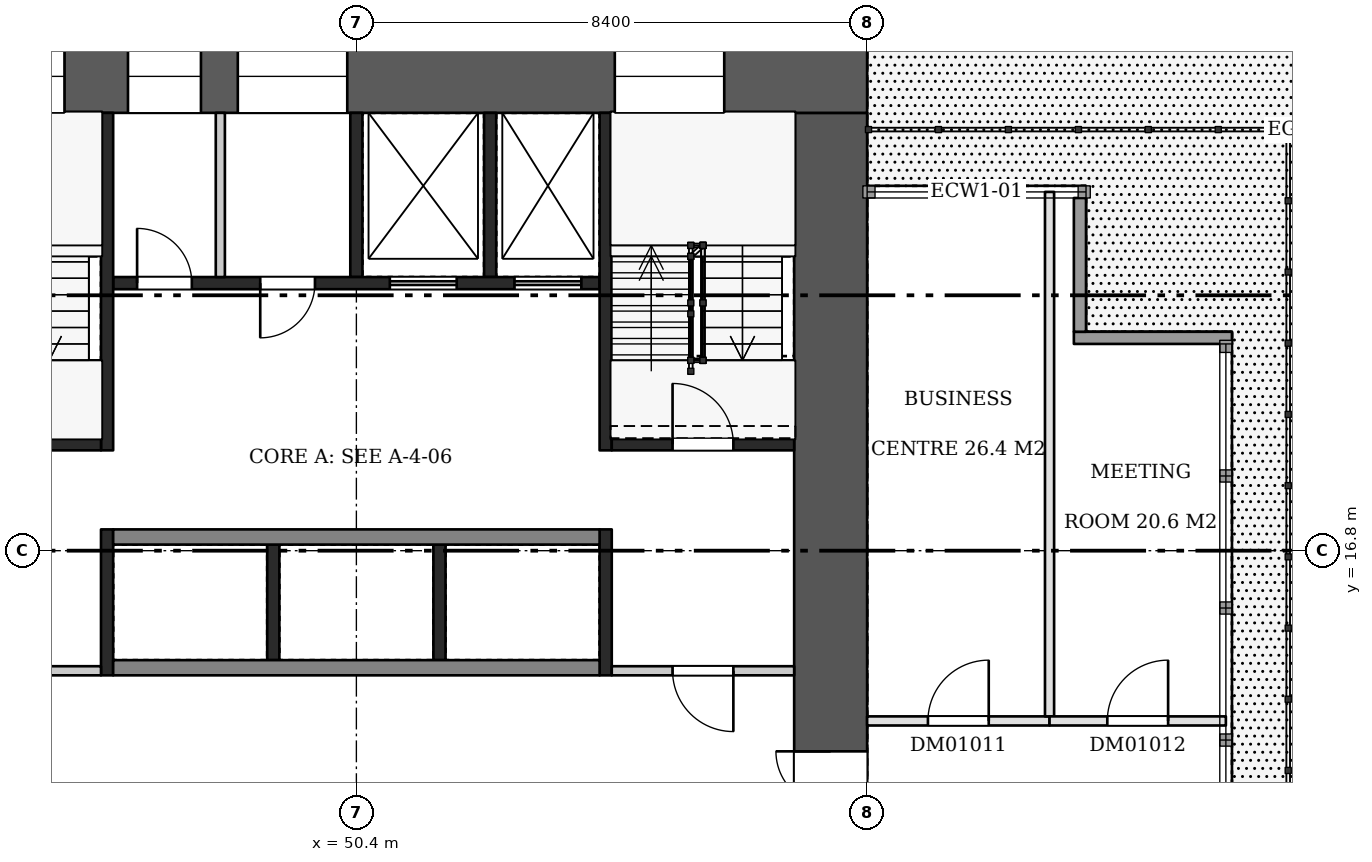
"""IFC4 building model, lengths in metres.
Left out: names, types, materials, properties, quantities, classifications, styles, units other than length and angle.
Written with IfcOpenShell. Run it as: python <this file> out.ifc"""

import sys

from ifc_helpers import new_model, si_unit, direction, frame, frame_2d, origin, place, context, subcontext, project, spatial, rectangle, extrude, element, fill, save


model = new_model("IFC4")
c1 = context("Model", 3, precision=1e-05, world=origin(), true_north=direction((0.0, 1.0)))
c2 = subcontext(c1, "Body", "Model", "MODEL_VIEW")
j1 = project(units=[si_unit("LENGTHUNIT", "METRE"), si_unit("PLANEANGLEUNIT", "RADIAN")], contexts=[c1])
p1 = place(None, origin())
s1 = spatial("IfcSite", under=j1, at=p1, CompositionType="ELEMENT")
p2 = place(p1, origin())
s2 = spatial("IfcBuilding", under=s1, at=p2, CompositionType="ELEMENT")
p3 = place(p2, frame((0.0, 0.0, 9.0)))
s3 = spatial("IfcBuildingStorey", under=s2, at=p3, CompositionType="ELEMENT", Elevation=9.0)
p4 = place(p3, frame((42.0, 24.6, 0.0), z_axis=(0.0, 0.0, 1.0), x_axis=(1.0, 0.0, 0.0)))
e1 = element("IfcWall", 1, at=p4, inside=s3, PredefinedType="SHEAR", context=c2, shape_type="SweptSolid", body=[
    extrude(rectangle(XDim=16.8, YDim=1.2, at=frame_2d((8.4, 0.0))), origin(), (0.0, 0.0, 1.0), 4.98),
])
p5 = place(p4, frame((1.8, 0.0, 0.5)))
e2 = element("IfcOpeningElement", 2, at=p5, cuts=e1, PredefinedType="OPENING", context=c2, shape_type="SweptSolid", body=[
    extrude(rectangle(XDim=1.8, YDim=2.4, at=frame_2d((0.9, 1.2))), frame((0.0, 0.61, 0.0), z_axis=(0.0, -1.0, 0.0), x_axis=(1.0, 0.0, 0.0)), (0.0, 0.0, 1.0), 1.22),
])
p6 = place(p4, frame((4.644, 0.0, 1.6)))
e3 = element("IfcOpeningElement", 3, at=p6, cuts=e1, PredefinedType="OPENING", context=c2, shape_type="SweptSolid", body=[
    extrude(rectangle(XDim=1.2, YDim=1.2, at=frame_2d((0.6, 0.6))), frame((0.0, 0.61, 0.0), z_axis=(0.0, -1.0, 0.0), x_axis=(1.0, 0.0, 0.0)), (0.0, 0.0, 1.0), 1.22),
])
p7 = place(p4, frame((6.45, 0.0, 1.6)))
e4 = element("IfcOpeningElement", 4, at=p7, cuts=e1, PredefinedType="OPENING", context=c2, shape_type="SweptSolid", body=[
    extrude(rectangle(XDim=1.8, YDim=1.2, at=frame_2d((0.9, 0.6))), frame((0.0, 0.61, 0.0), z_axis=(0.0, -1.0, 0.0), x_axis=(1.0, 0.0, 0.0)), (0.0, 0.0, 1.0), 1.22),
])
p8 = place(p4, frame((12.65, 0.0, 0.5)))
e5 = element("IfcOpeningElement", 5, at=p8, cuts=e1, PredefinedType="OPENING", context=c2, shape_type="SweptSolid", body=[
    extrude(rectangle(XDim=1.8, YDim=2.4, at=frame_2d((0.9, 1.2))), frame((0.0, 0.61, 0.0), z_axis=(0.0, -1.0, 0.0), x_axis=(1.0, 0.0, 0.0)), (0.0, 0.0, 1.0), 1.22),
])
p9 = place(p3, frame((58.2, 9.6, 0.0), z_axis=(0.0, 0.0, 1.0), x_axis=(0.0, 1.0, 0.0)))
e6 = element("IfcWall", 6, at=p9, inside=s3, PredefinedType="SHEAR", context=c2, shape_type="SweptSolid", body=[
    extrude(rectangle(XDim=14.4, YDim=1.2, at=frame_2d((7.2, 0.0))), origin(), (0.0, 0.0, 1.0), 4.98),
])
p10 = place(p9, frame((2.1, 0.0, 0.0)))
e7 = element("IfcOpeningElement", 7, at=p10, cuts=e6, PredefinedType="OPENING", context=c2, shape_type="SweptSolid", body=[
    extrude(rectangle(XDim=1.8, YDim=2.1, at=frame_2d((0.9, 1.05))), frame((0.0, 0.61, 0.0), z_axis=(0.0, -1.0, 0.0), x_axis=(1.0, 0.0, 0.0)), (0.0, 0.0, 1.0), 1.22),
])
for number, where, z_axis, x_axis in (
    (8, (49.033, 15.0, 0.0), (0.0, 0.0, 1.0), (0.0, 1.0, 0.0)),
    (9, (51.767, 15.0, 0.0), (0.0, 0.0, 1.0), (0.0, 1.0, 0.0)),
):
    element("IfcWall", number, at=place(p3, frame(where, z_axis=z_axis, x_axis=x_axis)), inside=s3, PredefinedType="SHEAR", context=c2, shape_type="SweptSolid", body=[
        extrude(rectangle(XDim=1.9, YDim=0.2, at=frame_2d((0.95, 0.0))), origin(), (0.0, 0.0, 1.0), 4.98),
    ])
for number, where, z_axis, x_axis in (
    (10, (46.4, 14.875, 0.0), (0.0, 0.0, 1.0), (1.0, 0.0, 0.0)),
    (11, (46.4, 17.025, 0.0), (0.0, 0.0, 1.0), (1.0, 0.0, 0.0)),
):
    element("IfcWall", number, at=place(p3, frame(where, z_axis=z_axis, x_axis=x_axis)), inside=s3, PredefinedType="SHEAR", context=c2, shape_type="SweptSolid", body=[
        extrude(rectangle(XDim=8.0, YDim=0.25, at=frame_2d((4.0, 0.0))), origin(), (0.0, 0.0, 1.0), 4.98),
    ])
for number, where, z_axis, x_axis in (
    (12, (50.4, 21.3, 0.0), (0.0, 0.0, 1.0), (0.0, 1.0, 0.0)),
    (13, (52.6, 21.3, 0.0), (0.0, 0.0, 1.0), (0.0, 1.0, 0.0)),
):
    element("IfcWall", number, at=place(p3, frame(where, z_axis=z_axis, x_axis=x_axis)), inside=s3, PredefinedType="SHEAR", context=c2, shape_type="SweptSolid", body=[
        extrude(rectangle(XDim=2.7, YDim=0.2, at=frame_2d((1.35, 0.0))), origin(), (0.0, 0.0, 1.0), 4.98),
    ])
p11 = place(p3, frame((48.163, 21.3, 0.0), z_axis=(0.0, 0.0, 1.0), x_axis=(0.0, 1.0, 0.0)))
e14 = element("IfcWall", 14, at=p11, inside=s3, PredefinedType="PARTITIONING", context=c2, shape_type="SweptSolid", body=[
    extrude(rectangle(XDim=2.7, YDim=0.15, at=frame_2d((1.35, 0.0))), origin(), (0.0, 0.0, 1.0), 4.98),
])
p12 = place(p3, frame((46.4, 21.2, 0.0), z_axis=(0.0, 0.0, 1.0), x_axis=(1.0, 0.0, 0.0)))
e15 = element("IfcWall", 15, at=p12, inside=s3, PredefinedType="SHEAR", context=c2, shape_type="SweptSolid", body=[
    extrude(rectangle(XDim=8.0, YDim=0.2, at=frame_2d((4.0, 0.0))), origin(), (0.0, 0.0, 1.0), 4.98),
])
p13 = place(p12, frame((0.394, 0.0, 0.0)))
e16 = element("IfcOpeningElement", 16, at=p13, cuts=e15, PredefinedType="OPENING", context=c2, shape_type="SweptSolid", body=[
    extrude(rectangle(XDim=0.9, YDim=2.1, at=frame_2d((0.45, 1.05))), frame((0.0, 0.11, 0.0), z_axis=(0.0, -1.0, 0.0), x_axis=(1.0, 0.0, 0.0)), (0.0, 0.0, 1.0), 0.22),
])
p14 = place(p12, frame((2.419, 0.0, 0.0)))
e17 = element("IfcOpeningElement", 17, at=p14, cuts=e15, PredefinedType="OPENING", context=c2, shape_type="SweptSolid", body=[
    extrude(rectangle(XDim=0.9, YDim=2.1, at=frame_2d((0.45, 1.05))), frame((0.0, 0.11, 0.0), z_axis=(0.0, -1.0, 0.0), x_axis=(1.0, 0.0, 0.0)), (0.0, 0.0, 1.0), 0.22),
])
p15 = place(p12, frame((4.55, 0.0, 0.0)))
e18 = element("IfcOpeningElement", 18, at=p15, cuts=e15, PredefinedType="OPENING", context=c2, shape_type="SweptSolid", body=[
    extrude(rectangle(XDim=1.1, YDim=2.1, at=frame_2d((0.55, 1.05))), frame((0.0, 0.11, 0.0), z_axis=(0.0, -1.0, 0.0), x_axis=(1.0, 0.0, 0.0)), (0.0, 0.0, 1.0), 0.22),
])
p16 = place(p12, frame((6.6, 0.0, 0.0)))
e19 = element("IfcOpeningElement", 19, at=p16, cuts=e15, PredefinedType="OPENING", context=c2, shape_type="SweptSolid", body=[
    extrude(rectangle(XDim=1.1, YDim=2.1, at=frame_2d((0.55, 1.05))), frame((0.0, 0.11, 0.0), z_axis=(0.0, -1.0, 0.0), x_axis=(1.0, 0.0, 0.0)), (0.0, 0.0, 1.0), 0.22),
])
p17 = place(p3, frame((46.3, 14.75, 0.0), z_axis=(0.0, 0.0, 1.0), x_axis=(0.0, 1.0, 0.0)))
e20 = element("IfcWall", 20, at=p17, inside=s3, PredefinedType="SHEAR", context=c2, shape_type="SweptSolid", body=[
    extrude(rectangle(XDim=2.4, YDim=0.2, at=frame_2d((1.2, 0.0))), origin(), (0.0, 0.0, 1.0), 4.98),
])
p18 = place(p3, frame((46.3, 18.45, 0.0), z_axis=(0.0, 0.0, 1.0), x_axis=(0.0, 1.0, 0.0)))
e21 = element("IfcWall", 21, at=p18, inside=s3, PredefinedType="SHEAR", context=c2, shape_type="SweptSolid", body=[
    extrude(rectangle(XDim=5.55, YDim=0.2, at=frame_2d((2.775, 0.0))), origin(), (0.0, 0.0, 1.0), 4.98),
])
p19 = place(p3, frame((43.2, 14.825, 0.0), z_axis=(0.0, 0.0, 1.0), x_axis=(1.0, 0.0, 0.0)))
e22 = element("IfcWall", 22, at=p19, inside=s3, PredefinedType="PARTITIONING", context=c2, shape_type="SweptSolid", body=[
    extrude(rectangle(XDim=3.0, YDim=0.15, at=frame_2d((1.5, 0.0))), origin(), (0.0, 0.0, 1.0), 4.98),
])
p20 = place(p19, frame((1.0, 0.0, 0.0)))
e23 = element("IfcOpeningElement", 23, at=p20, cuts=e22, PredefinedType="OPENING", context=c2, shape_type="SweptSolid", body=[
    extrude(rectangle(XDim=1.0, YDim=2.1, at=frame_2d((0.5, 1.05))), frame((0.0, 0.085, 0.0), z_axis=(0.0, -1.0, 0.0), x_axis=(1.0, 0.0, 0.0)), (0.0, 0.0, 1.0), 0.17),
])
p21 = place(p3, frame((43.2, 18.55, 0.0), z_axis=(0.0, 0.0, 1.0), x_axis=(1.0, 0.0, 0.0)))
e24 = element("IfcWall", 24, at=p21, inside=s3, PredefinedType="SHEAR", context=c2, shape_type="SweptSolid", body=[
    extrude(rectangle(XDim=3.0, YDim=0.2, at=frame_2d((1.5, 0.0))), origin(), (0.0, 0.0, 1.0), 4.98),
])
p22 = place(p21, frame((1.0, 0.0, 0.0)))
e25 = element("IfcOpeningElement", 25, at=p22, cuts=e24, PredefinedType="OPENING", context=c2, shape_type="SweptSolid", body=[
    extrude(rectangle(XDim=1.0, YDim=2.1, at=frame_2d((0.5, 1.05))), frame((0.0, 0.11, 0.0), z_axis=(0.0, -1.0, 0.0), x_axis=(1.0, 0.0, 0.0)), (0.0, 0.0, 1.0), 0.22),
])
p23 = place(p3, frame((54.5, 14.75, 0.0), z_axis=(0.0, 0.0, 1.0), x_axis=(0.0, 1.0, 0.0)))
e26 = element("IfcWall", 26, at=p23, inside=s3, PredefinedType="SHEAR", context=c2, shape_type="SweptSolid", body=[
    extrude(rectangle(XDim=2.4, YDim=0.2, at=frame_2d((1.2, 0.0))), origin(), (0.0, 0.0, 1.0), 4.98),
])
p24 = place(p3, frame((54.5, 18.45, 0.0), z_axis=(0.0, 0.0, 1.0), x_axis=(0.0, 1.0, 0.0)))
e27 = element("IfcWall", 27, at=p24, inside=s3, PredefinedType="SHEAR", context=c2, shape_type="SweptSolid", body=[
    extrude(rectangle(XDim=5.55, YDim=0.2, at=frame_2d((2.775, 0.0))), origin(), (0.0, 0.0, 1.0), 4.98),
])
p25 = place(p3, frame((54.6, 14.825, 0.0), z_axis=(0.0, 0.0, 1.0), x_axis=(1.0, 0.0, 0.0)))
e28 = element("IfcWall", 28, at=p25, inside=s3, PredefinedType="PARTITIONING", context=c2, shape_type="SweptSolid", body=[
    extrude(rectangle(XDim=3.0, YDim=0.15, at=frame_2d((1.5, 0.0))), origin(), (0.0, 0.0, 1.0), 4.98),
])
p26 = place(p25, frame((1.0, 0.0, 0.0)))
e29 = element("IfcOpeningElement", 29, at=p26, cuts=e28, PredefinedType="OPENING", context=c2, shape_type="SweptSolid", body=[
    extrude(rectangle(XDim=1.0, YDim=2.1, at=frame_2d((0.5, 1.05))), frame((0.0, 0.085, 0.0), z_axis=(0.0, -1.0, 0.0), x_axis=(1.0, 0.0, 0.0)), (0.0, 0.0, 1.0), 0.17),
])
p27 = place(p3, frame((54.6, 18.55, 0.0), z_axis=(0.0, 0.0, 1.0), x_axis=(1.0, 0.0, 0.0)))
e30 = element("IfcWall", 30, at=p27, inside=s3, PredefinedType="SHEAR", context=c2, shape_type="SweptSolid", body=[
    extrude(rectangle(XDim=3.0, YDim=0.2, at=frame_2d((1.5, 0.0))), origin(), (0.0, 0.0, 1.0), 4.98),
])
p28 = place(p27, frame((1.0, 0.0, 0.0)))
e31 = element("IfcOpeningElement", 31, at=p28, cuts=e30, PredefinedType="OPENING", context=c2, shape_type="SweptSolid", body=[
    extrude(rectangle(XDim=1.0, YDim=2.1, at=frame_2d((0.5, 1.05))), frame((0.0, 0.11, 0.0), z_axis=(0.0, -1.0, 0.0), x_axis=(1.0, 0.0, 0.0)), (0.0, 0.0, 1.0), 0.22),
])
p29 = place(p3, frame((58.8, 14.0, 0.0), z_axis=(0.0, 0.0, 1.0), x_axis=(1.0, 0.0, 0.0)))
e32 = element("IfcWall", 32, at=p29, inside=s3, PredefinedType="PARTITIONING", context=c2, shape_type="SweptSolid", body=[
    extrude(rectangle(XDim=3.0, YDim=0.15, at=frame_2d((1.5, 0.0))), origin(), (0.0, 0.0, 1.0), 4.95),
])
p30 = place(p29, frame((1.0, 0.0, 0.0)))
e33 = element("IfcOpeningElement", 33, at=p30, cuts=e32, PredefinedType="OPENING", context=c2, shape_type="SweptSolid", body=[
    extrude(rectangle(XDim=1.0, YDim=2.1, at=frame_2d((0.5, 1.05))), frame((0.0, 0.085, 0.0), z_axis=(0.0, -1.0, 0.0), x_axis=(1.0, 0.0, 0.0)), (0.0, 0.0, 1.0), 0.17),
])
p31 = place(p3, frame((61.8, 14.075, 0.0), z_axis=(0.0, 0.0, 1.0), x_axis=(0.0, 1.0, 0.0)))
e34 = element("IfcWall", 34, at=p31, inside=s3, PredefinedType="PARTITIONING", context=c2, shape_type="SweptSolid", body=[
    extrude(rectangle(XDim=8.625, YDim=0.15, at=frame_2d((4.312, 0.0))), origin(), (0.0, 0.0, 1.0), 4.95),
])
p32 = place(p3, frame((61.8, 14.0, 0.0), z_axis=(0.0, 0.0, 1.0), x_axis=(1.0, 0.0, 0.0)))
e35 = element("IfcWall", 35, at=p32, inside=s3, PredefinedType="PARTITIONING", context=c2, shape_type="SweptSolid", body=[
    extrude(rectangle(XDim=2.9, YDim=0.15, at=frame_2d((1.45, 0.0))), origin(), (0.0, 0.0, 1.0), 4.95),
])
p33 = place(p32, frame((0.95, 0.0, 0.0)))
e36 = element("IfcOpeningElement", 36, at=p33, cuts=e35, PredefinedType="OPENING", context=c2, shape_type="SweptSolid", body=[
    extrude(rectangle(XDim=1.0, YDim=2.1, at=frame_2d((0.5, 1.05))), frame((0.0, 0.085, 0.0), z_axis=(0.0, -1.0, 0.0), x_axis=(1.0, 0.0, 0.0)), (0.0, 0.0, 1.0), 0.17),
])
p34 = place(p3, frame((64.8, 20.3, 0.0), z_axis=(0.0, 0.0, 1.0), x_axis=(-1.0, 0.0, 0.0)))
e37 = element("IfcWall", 37, at=p34, inside=s3, PredefinedType="SOLIDWALL", context=c2, shape_type="SweptSolid", body=[
    extrude(rectangle(XDim=2.6, YDim=0.2, at=frame_2d((1.3, 0.0))), origin(), (0.0, 0.0, 1.0), 4.95),
])
p35 = place(p3, frame((62.3, 20.4, 0.0), z_axis=(0.0, 0.0, 1.0), x_axis=(0.0, 1.0, 0.0)))
e38 = element("IfcWall", 38, at=p35, inside=s3, PredefinedType="SOLIDWALL", context=c2, shape_type="SweptSolid", body=[
    extrude(rectangle(XDim=2.2, YDim=0.2, at=frame_2d((1.1, 0.0))), origin(), (0.0, 0.0, 1.0), 4.95),
])
p36 = place(p10, origin())
e39 = element("IfcDoor", 39, at=p36, inside=s3, OperationType="DOUBLE_DOOR_SINGLE_SWING", PredefinedType="DOOR", context=c2, shape_type="SweptSolid", body=[
    extrude(rectangle(XDim=1.8, YDim=2.1, at=frame_2d((0.9, 1.05))), frame((0.0, 0.025, 0.0), z_axis=(0.0, -1.0, 0.0), x_axis=(1.0, 0.0, 0.0)), (0.0, 0.0, 1.0), 0.05),
])
fill(e7, e39)
p37 = place(p13, origin())
e40 = element("IfcDoor", 40, at=p37, inside=s3, OperationType="SINGLE_SWING_LEFT", PredefinedType="DOOR", context=c2, shape_type="SweptSolid", body=[
    extrude(rectangle(XDim=0.9, YDim=2.1, at=frame_2d((0.45, 1.05))), frame((0.0, 0.025, 0.0), z_axis=(0.0, -1.0, 0.0), x_axis=(1.0, 0.0, 0.0)), (0.0, 0.0, 1.0), 0.05),
])
fill(e16, e40)
p38 = place(p14, frame((0.9, 0.0, 0.0), z_axis=(0.0, 0.0, 1.0), x_axis=(-1.0, 0.0, 0.0)))
e41 = element("IfcDoor", 41, at=p38, inside=s3, OperationType="SINGLE_SWING_RIGHT", PredefinedType="DOOR", context=c2, shape_type="SweptSolid", body=[
    extrude(rectangle(XDim=0.9, YDim=2.1, at=frame_2d((0.45, 1.05))), frame((0.0, 0.025, 0.0), z_axis=(0.0, -1.0, 0.0), x_axis=(1.0, 0.0, 0.0)), (0.0, 0.0, 1.0), 0.05),
])
fill(e17, e41)
p39 = place(p15, origin())
e42 = element("IfcDoor", 42, at=p39, inside=s3, OperationType="DOUBLE_DOOR_SLIDING", PredefinedType="DOOR", context=c2, shape_type="SweptSolid", body=[
    extrude(rectangle(XDim=1.1, YDim=2.1, at=frame_2d((0.55, 1.05))), frame((0.0, 0.025, 0.0), z_axis=(0.0, -1.0, 0.0), x_axis=(1.0, 0.0, 0.0)), (0.0, 0.0, 1.0), 0.05),
])
fill(e18, e42)
p40 = place(p16, origin())
e43 = element("IfcDoor", 43, at=p40, inside=s3, OperationType="DOUBLE_DOOR_SLIDING", PredefinedType="DOOR", context=c2, shape_type="SweptSolid", body=[
    extrude(rectangle(XDim=1.1, YDim=2.1, at=frame_2d((0.55, 1.05))), frame((0.0, 0.025, 0.0), z_axis=(0.0, -1.0, 0.0), x_axis=(1.0, 0.0, 0.0)), (0.0, 0.0, 1.0), 0.05),
])
fill(e19, e43)
p41 = place(p26, frame((1.0, 0.0, 0.0), z_axis=(0.0, 0.0, 1.0), x_axis=(-1.0, 0.0, 0.0)))
e44 = element("IfcDoor", 44, at=p41, inside=s3, OperationType="SINGLE_SWING_LEFT", PredefinedType="DOOR", context=c2, shape_type="SweptSolid", body=[
    extrude(rectangle(XDim=1.0, YDim=2.1, at=frame_2d((0.5, 1.05))), frame((0.0, 0.025, 0.0), z_axis=(0.0, -1.0, 0.0), x_axis=(1.0, 0.0, 0.0)), (0.0, 0.0, 1.0), 0.05),
])
fill(e29, e44)
p42 = place(p28, origin())
e45 = element("IfcDoor", 45, at=p42, inside=s3, OperationType="SINGLE_SWING_LEFT", PredefinedType="DOOR", context=c2, shape_type="SweptSolid", body=[
    extrude(rectangle(XDim=1.0, YDim=2.1, at=frame_2d((0.5, 1.05))), frame((0.0, 0.025, 0.0), z_axis=(0.0, -1.0, 0.0), x_axis=(1.0, 0.0, 0.0)), (0.0, 0.0, 1.0), 0.05),
])
fill(e31, e45)
p43 = place(p5, origin())
e46 = element("IfcWindow", 46, at=p43, inside=s3, PartitioningType="SINGLE_PANEL", PredefinedType="WINDOW", context=c2, shape_type="SweptSolid", body=[
    extrude(rectangle(XDim=1.8, YDim=2.4, at=frame_2d((0.9, 1.2))), frame((0.0, 0.03, 0.0), z_axis=(0.0, -1.0, 0.0), x_axis=(1.0, 0.0, 0.0)), (0.0, 0.0, 1.0), 0.06),
])
fill(e2, e46)
p44 = place(p6, origin())
e47 = element("IfcWindow", 47, at=p44, inside=s3, PartitioningType="SINGLE_PANEL", PredefinedType="WINDOW", context=c2, shape_type="SweptSolid", body=[
    extrude(rectangle(XDim=1.2, YDim=1.2, at=frame_2d((0.6, 0.6))), frame((0.0, 0.03, 0.0), z_axis=(0.0, -1.0, 0.0), x_axis=(1.0, 0.0, 0.0)), (0.0, 0.0, 1.0), 0.06),
])
fill(e3, e47)
p45 = place(p7, origin())
e48 = element("IfcWindow", 48, at=p45, inside=s3, PartitioningType="SINGLE_PANEL", PredefinedType="WINDOW", context=c2, shape_type="SweptSolid", body=[
    extrude(rectangle(XDim=1.8, YDim=1.2, at=frame_2d((0.9, 0.6))), frame((0.0, 0.03, 0.0), z_axis=(0.0, -1.0, 0.0), x_axis=(1.0, 0.0, 0.0)), (0.0, 0.0, 1.0), 0.06),
])
fill(e4, e48)
p46 = place(p8, origin())
e49 = element("IfcWindow", 49, at=p46, inside=s3, PartitioningType="SINGLE_PANEL", PredefinedType="WINDOW", context=c2, shape_type="SweptSolid", body=[
    extrude(rectangle(XDim=1.8, YDim=2.4, at=frame_2d((0.9, 1.2))), frame((0.0, 0.03, 0.0), z_axis=(0.0, -1.0, 0.0), x_axis=(1.0, 0.0, 0.0)), (0.0, 0.0, 1.0), 0.06),
])
fill(e5, e49)
p47 = place(p30, origin())
e50 = element("IfcDoor", 50, at=p47, inside=s3, OperationType="SINGLE_SWING_RIGHT", PredefinedType="DOOR", context=c2, shape_type="SweptSolid", body=[
    extrude(rectangle(XDim=1.0, YDim=2.1, at=frame_2d((0.5, 1.05))), frame((0.0, 0.025, 0.0), z_axis=(0.0, -1.0, 0.0), x_axis=(1.0, 0.0, 0.0)), (0.0, 0.0, 1.0), 0.05),
])
fill(e33, e50)
p48 = place(p33, origin())
e51 = element("IfcDoor", 51, at=p48, inside=s3, OperationType="SINGLE_SWING_RIGHT", PredefinedType="DOOR", context=c2, shape_type="SweptSolid", body=[
    extrude(rectangle(XDim=1.0, YDim=2.1, at=frame_2d((0.5, 1.05))), frame((0.0, 0.025, 0.0), z_axis=(0.0, -1.0, 0.0), x_axis=(1.0, 0.0, 0.0)), (0.0, 0.0, 1.0), 0.05),
])
fill(e36, e51)
save(model, sys.argv[1])
